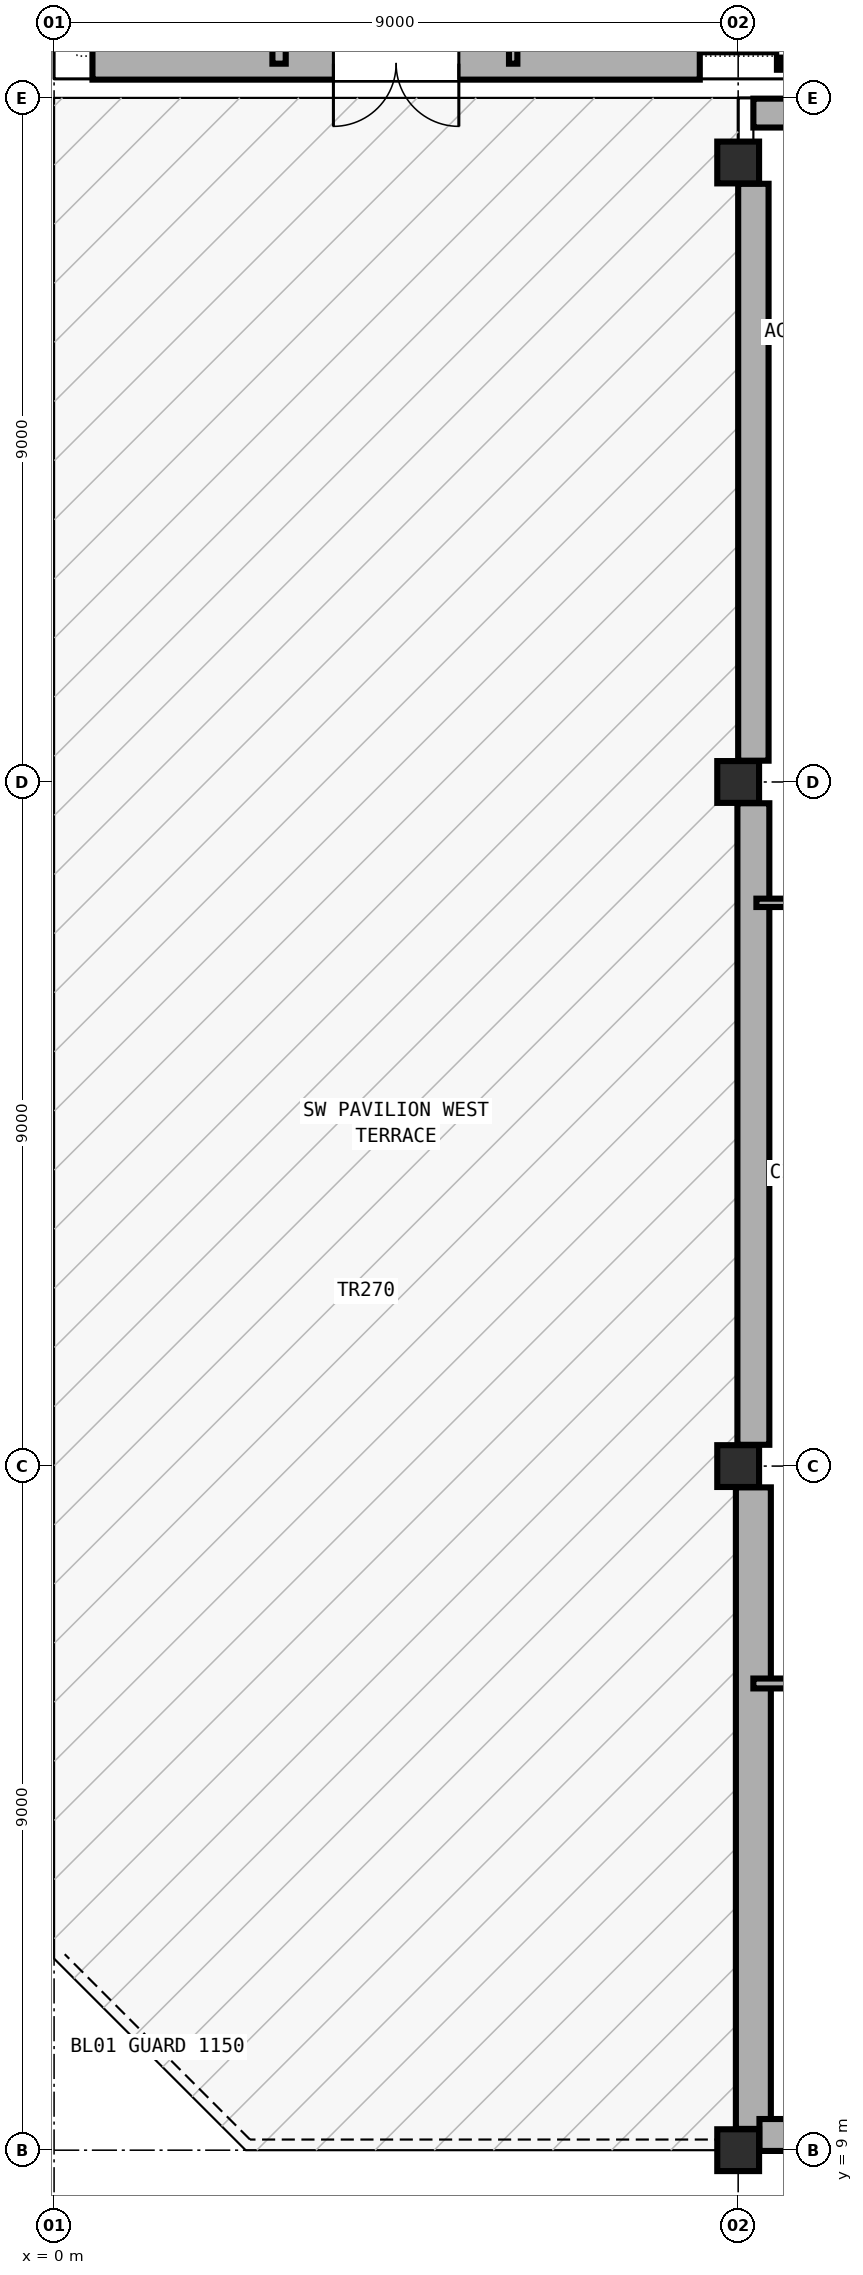
"""IFC4 building model, lengths in metres.
Left out: names, types, materials, properties, quantities, classifications, styles, units other than length and angle.
Written with IfcOpenShell. Run it as: python <this file> out.ifc"""

import sys

from ifc_helpers import new_model, si_unit, direction, frame, frame_2d, origin, origin_2d, place, context, subcontext, project, spatial, rectangle, extrude, element, fill, save


model = new_model("IFC4")
c1 = context("Model", 3, precision=1e-05, world=origin(), true_north=direction((0.0, 1.0)))
c2 = subcontext(c1, "Body", "Model", "MODEL_VIEW")
j1 = project(units=[si_unit("LENGTHUNIT", "METRE"), si_unit("PLANEANGLEUNIT", "RADIAN")], contexts=[c1])
p1 = place(None, origin())
s1 = spatial("IfcSite", under=j1, at=p1, CompositionType="ELEMENT")
p2 = place(p1, origin())
s2 = spatial("IfcBuilding", under=s1, at=p2, CompositionType="ELEMENT")
p3 = place(p2, frame((0.0, 0.0, 9.6)))
s3 = spatial("IfcBuildingStorey", under=s2, at=p3, CompositionType="ELEMENT", Elevation=9.6)
for number, where, z_axis, x_axis in (
    (1, (9.0, 9.0, 0.0), (0.0, 0.0, 1.0), (1.0, 0.0, 0.0)),
    (2, (9.0, 18.0, 0.0), (0.0, 0.0, 1.0), (1.0, 0.0, 0.0)),
    (3, (9.0, 27.0, 0.0), (0.0, 0.0, 1.0), (1.0, 0.0, 0.0)),
    (4, (9.0, 35.15, 0.0), (0.0, 0.0, 1.0), (1.0, 0.0, 0.0)),
):
    element("IfcColumn", number, at=place(p3, frame(where, z_axis=z_axis, x_axis=x_axis)), inside=s3, PredefinedType="COLUMN", context=c2, shape_type="SweptSolid", body=[
        extrude(rectangle(XDim=0.55, YDim=0.55, at=origin_2d()), origin(), (0.0, 0.0, 1.0), 4.8),
    ])
p4 = place(p3, frame((8.495, 36.45, 0.0), z_axis=(0.0, 0.0, 1.0), x_axis=(-1.0, 0.0, 0.0)))
e5 = element("IfcWall", 5, at=p4, inside=s3, PredefinedType="SOLIDWALL", context=c2, shape_type="SweptSolid", body=[
    extrude(rectangle(XDim=7.99, YDim=0.42, at=frame_2d((3.995, 0.0))), origin(), (0.0, 0.0, 1.0), 3.58),
])
p5 = place(p4, frame((3.17, 0.0, 0.0)))
e6 = element("IfcOpeningElement", 6, at=p5, cuts=e5, PredefinedType="OPENING", context=c2, shape_type="SweptSolid", body=[
    extrude(rectangle(XDim=1.65, YDim=2.2, at=frame_2d((0.825, 1.1))), frame((0.0, 0.22, 0.0), z_axis=(0.0, -1.0, 0.0), x_axis=(1.0, 0.0, 0.0)), (0.0, 0.0, 1.0), 0.44),
])
p6 = place(p3, frame((9.2, 9.28, 0.0), z_axis=(0.0, 0.0, 1.0), x_axis=(0.0, 1.0, 0.0)))
e7 = element("IfcWall", 7, at=p6, inside=s3, PredefinedType="SOLIDWALL", context=c2, shape_type="SweptSolid", body=[
    extrude(rectangle(XDim=8.44, YDim=0.46, at=frame_2d((4.22, 0.0))), origin(), (0.0, 0.0, 1.0), 3.58),
])
p7 = place(p3, frame((9.2, 18.28, 0.0), z_axis=(0.0, 0.0, 1.0), x_axis=(0.0, 1.0, 0.0)))
e8 = element("IfcWall", 8, at=p7, inside=s3, PredefinedType="SOLIDWALL", context=c2, shape_type="SweptSolid", body=[
    extrude(rectangle(XDim=8.44, YDim=0.42, at=frame_2d((4.22, 0.0))), origin(), (0.0, 0.0, 1.0), 3.58),
])
p8 = place(p3, frame((9.2, 27.28, 0.0), z_axis=(0.0, 0.0, 1.0), x_axis=(0.0, 1.0, 0.0)))
e9 = element("IfcWall", 9, at=p8, inside=s3, PredefinedType="SOLIDWALL", context=c2, shape_type="SweptSolid", body=[
    extrude(rectangle(XDim=7.59, YDim=0.4, at=frame_2d((3.795, 0.0))), origin(), (0.0, 0.0, 1.0), 3.58),
])
p9 = place(p3, frame((9.2, 35.8, 0.0), z_axis=(0.0, 0.0, 1.0), x_axis=(1.0, 0.0, 0.0)))
e10 = element("IfcWall", 10, at=p9, inside=s3, PredefinedType="SOLIDWALL", context=c2, shape_type="SweptSolid", body=[
    extrude(rectangle(XDim=8.92, YDim=0.38, at=frame_2d((4.46, 0.0))), origin(), (0.0, 0.0, 1.0), 3.58),
])
p10 = place(p9, frame((3.535, 0.0, 0.9)))
e11 = element("IfcOpeningElement", 11, at=p10, cuts=e10, PredefinedType="OPENING", context=c2, shape_type="SweptSolid", body=[
    extrude(rectangle(XDim=1.85, YDim=1.95, at=frame_2d((0.925, 0.975))), frame((0.0, 0.2, 0.0), z_axis=(0.0, -1.0, 0.0), x_axis=(1.0, 0.0, 0.0)), (0.0, 0.0, 1.0), 0.4),
])
p11 = place(p3, frame((17.72, 9.2, 0.0), z_axis=(0.0, 0.0, 1.0), x_axis=(-1.0, 0.0, 0.0)))
e12 = element("IfcWall", 12, at=p11, inside=s3, PredefinedType="SOLIDWALL", context=c2, shape_type="SweptSolid", body=[
    extrude(rectangle(XDim=8.44, YDim=0.42, at=frame_2d((4.22, 0.0))), origin(), (0.0, 0.0, 1.0), 3.58),
])
p12 = place(p11, frame((3.32, 0.0, 0.9)))
e13 = element("IfcOpeningElement", 13, at=p12, cuts=e12, PredefinedType="OPENING", context=c2, shape_type="SweptSolid", body=[
    extrude(rectangle(XDim=1.8, YDim=1.75, at=frame_2d((0.9, 0.875))), frame((0.0, 0.22, 0.0), z_axis=(0.0, -1.0, 0.0), x_axis=(1.0, 0.0, 0.0)), (0.0, 0.0, 1.0), 0.44),
])
p13 = place(p3, frame((6.04, 59.23, 0.0), z_axis=(0.0, 0.0, 1.0), x_axis=(0.0, -1.0, 0.0)))
e14 = element("IfcWall", 14, at=p13, inside=s3, PredefinedType="PARTITIONING", context=c2, shape_type="SweptSolid", body=[
    extrude(rectangle(XDim=22.78, YDim=0.11, at=frame_2d((11.39, 0.0))), origin(), (0.0, 0.0, 1.0), 3.56),
])
p14 = place(p13, frame((9.263, 0.0, 0.0)))
e15 = element("IfcOpeningElement", 15, at=p14, cuts=e14, PredefinedType="OPENING", context=c2, shape_type="SweptSolid", body=[
    extrude(rectangle(XDim=1.55, YDim=2.2, at=frame_2d((0.775, 1.1))), frame((0.0, 0.065, 0.0), z_axis=(0.0, -1.0, 0.0), x_axis=(1.0, 0.0, 0.0)), (0.0, 0.0, 1.0), 0.13),
])
p15 = place(p3, frame((2.96, 36.45, 0.0), z_axis=(0.0, 0.0, 1.0), x_axis=(0.0, 1.0, 0.0)))
e16 = element("IfcWall", 16, at=p15, inside=s3, PredefinedType="PARTITIONING", context=c2, shape_type="SweptSolid", body=[
    extrude(rectangle(XDim=17.892, YDim=0.175, at=frame_2d((8.946, 0.0))), origin(), (0.0, 0.0, 1.0), 3.56),
])
p16 = place(p15, frame((11.613, 0.0, 0.0)))
e17 = element("IfcOpeningElement", 17, at=p16, cuts=e16, PredefinedType="OPENING", context=c2, shape_type="SweptSolid", body=[
    extrude(rectangle(XDim=1.02, YDim=2.16, at=frame_2d((0.51, 1.08))), frame((0.0, 0.097, 0.0), z_axis=(0.0, -1.0, 0.0), x_axis=(1.0, 0.0, 0.0)), (0.0, 0.0, 1.0), 0.195),
])
p17 = place(p3, frame((9.2, 15.14, 0.0), z_axis=(0.0, 0.0, 1.0), x_axis=(1.0, 0.0, 0.0)))
e18 = element("IfcWall", 18, at=p17, inside=s3, PredefinedType="PARTITIONING", context=c2, shape_type="SweptSolid", body=[
    extrude(rectangle(XDim=2.88, YDim=0.13, at=frame_2d((1.44, 0.0))), origin(), (0.0, 0.0, 1.0), 3.56),
])
p18 = place(p17, frame((0.915, 0.0, 0.0)))
e19 = element("IfcOpeningElement", 19, at=p18, cuts=e18, PredefinedType="OPENING", context=c2, shape_type="SweptSolid", body=[
    extrude(rectangle(XDim=1.05, YDim=2.1, at=frame_2d((0.525, 1.05))), frame((0.0, 0.075, 0.0), z_axis=(0.0, -1.0, 0.0), x_axis=(1.0, 0.0, 0.0)), (0.0, 0.0, 1.0), 0.15),
])
p19 = place(p3, frame((9.24, 25.41, 0.0), z_axis=(0.0, 0.0, 1.0), x_axis=(1.0, 0.0, 0.0)))
e20 = element("IfcWall", 20, at=p19, inside=s3, PredefinedType="PARTITIONING", context=c2, shape_type="SweptSolid", body=[
    extrude(rectangle(XDim=2.8, YDim=0.11, at=frame_2d((1.4, 0.0))), origin(), (0.0, 0.0, 1.0), 3.56),
])
p20 = place(p5, origin())
e21 = element("IfcDoor", 21, at=p20, inside=s3, OperationType="DOUBLE_DOOR_SINGLE_SWING", PredefinedType="DOOR", context=c2, shape_type="SweptSolid", body=[
    extrude(rectangle(XDim=1.65, YDim=2.2, at=frame_2d((0.825, 1.1))), frame((0.0, 0.025, 0.0), z_axis=(0.0, -1.0, 0.0), x_axis=(1.0, 0.0, 0.0)), (0.0, 0.0, 1.0), 0.05),
])
fill(e6, e21)
save(model, sys.argv[1])
